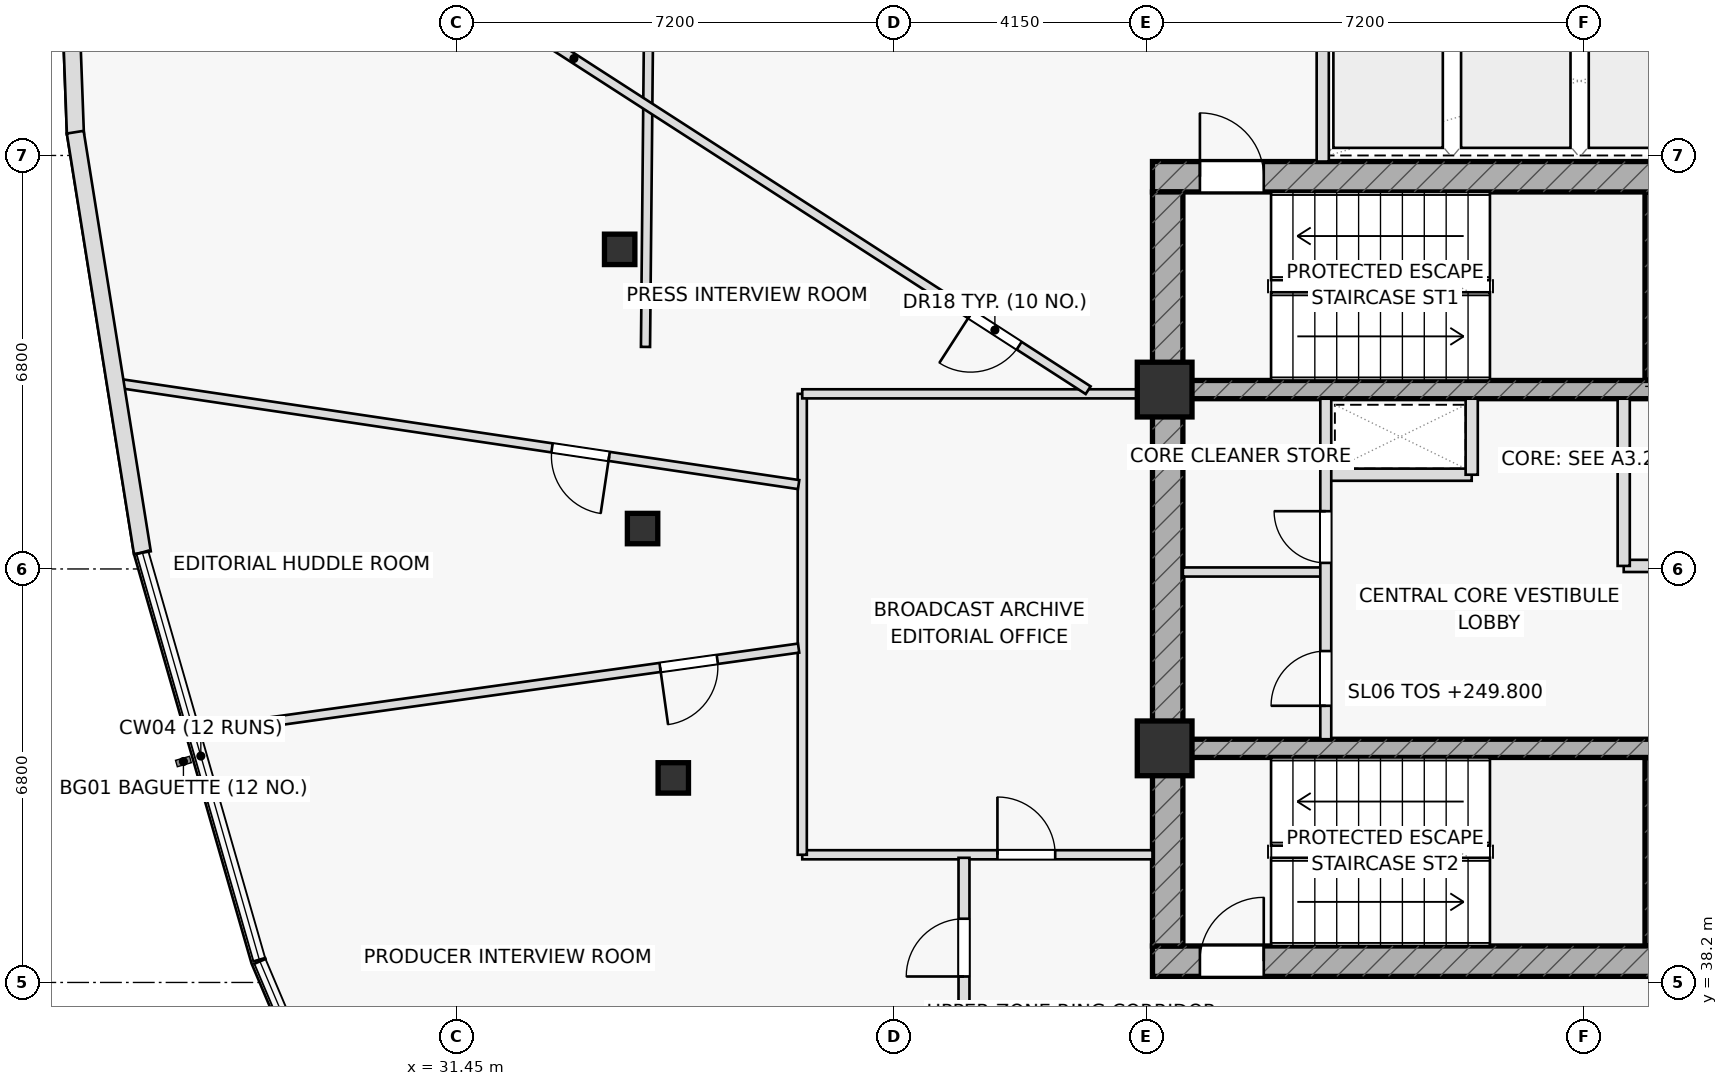
"""IFC4 building model, lengths in metres.
Left out: names, types, materials, properties, quantities, classifications, styles, units other than length and angle.
Written with IfcOpenShell. Run it as: python <this file> out.ifc"""

import sys

from ifc_helpers import new_model, si_unit, direction, frame, frame_2d, origin, origin_2d, place, context, subcontext, project, spatial, rectangle, hollow_rectangle, extrude, element, fill, save


model = new_model("IFC4")
c1 = context("Model", 3, precision=1e-05, world=origin(), true_north=direction((0.0, 1.0)))
c2 = subcontext(c1, "Body", "Model", "MODEL_VIEW")
j1 = project(units=[si_unit("LENGTHUNIT", "METRE"), si_unit("PLANEANGLEUNIT", "RADIAN")], contexts=[c1])
p1 = place(None, origin())
s1 = spatial("IfcSite", under=j1, at=p1, CompositionType="ELEMENT")
p2 = place(p1, origin())
s2 = spatial("IfcBuilding", under=s1, at=p2, CompositionType="ELEMENT")
p3 = place(p2, frame((0.0, 0.0, 249.8)))
s3 = spatial("IfcBuildingStorey", under=s2, at=p3, CompositionType="ELEMENT", Elevation=249.8)
for number, where, z_axis, x_axis in (
    (1, (51.11, 48.1, 0.0), (0.0, 0.0, 1.0), (0.0, 1.0, 0.0)),
    (2, (51.11, 38.8, 0.0), (0.0, 0.0, 1.0), (0.0, 1.0, 0.0)),
):
    element("IfcWall", number, at=place(p3, frame(where, z_axis=z_axis, x_axis=x_axis)), inside=s3, PredefinedType="SHEAR", context=c2, shape_type="SweptSolid", body=[
        extrude(rectangle(XDim=3.1, YDim=0.22, at=frame_2d((1.55, 0.0))), origin(), (0.0, 0.0, 1.0), 3.65),
    ])
p4 = place(p3, frame((42.9, 51.45, 0.0), z_axis=(0.0, 0.0, 1.0), x_axis=(1.0, 0.0, 0.0)))
e3 = element("IfcWall", 3, at=p4, inside=s3, PredefinedType="SHEAR", context=c2, shape_type="SweptSolid", body=[
    extrude(rectangle(XDim=14.2, YDim=0.5, at=frame_2d((7.1, 0.0))), origin(), (0.0, 0.0, 1.0), 3.65),
])
p5 = place(p4, frame((0.78, 0.0, 0.0)))
e4 = element("IfcOpeningElement", 4, at=p5, cuts=e3, PredefinedType="OPENING", context=c2, shape_type="SweptSolid", body=[
    extrude(rectangle(XDim=1.05, YDim=2.2, at=frame_2d((0.525, 1.1))), frame((0.0, 0.26, 0.0), z_axis=(0.0, -1.0, 0.0), x_axis=(1.0, 0.0, 0.0)), (0.0, 0.0, 1.0), 0.52),
])
p6 = place(p3, frame((42.9, 38.55, 0.0), z_axis=(0.0, 0.0, 1.0), x_axis=(1.0, 0.0, 0.0)))
e5 = element("IfcWall", 5, at=p6, inside=s3, PredefinedType="SHEAR", context=c2, shape_type="SweptSolid", body=[
    extrude(rectangle(XDim=14.2, YDim=0.5, at=frame_2d((7.1, 0.0))), origin(), (0.0, 0.0, 1.0), 3.65),
])
p7 = place(p6, frame((0.78, 0.0, 0.0)))
e6 = element("IfcOpeningElement", 6, at=p7, cuts=e5, PredefinedType="OPENING", context=c2, shape_type="SweptSolid", body=[
    extrude(rectangle(XDim=1.05, YDim=2.2, at=frame_2d((0.525, 1.1))), frame((0.0, 0.26, 0.0), z_axis=(0.0, -1.0, 0.0), x_axis=(1.0, 0.0, 0.0)), (0.0, 0.0, 1.0), 0.52),
])
p8 = place(p3, frame((43.15, 38.8, 0.0), z_axis=(0.0, 0.0, 1.0), x_axis=(0.0, 1.0, 0.0)))
e7 = element("IfcWall", 7, at=p8, inside=s3, PredefinedType="SHEAR", context=c2, shape_type="SweptSolid", body=[
    extrude(rectangle(XDim=12.4, YDim=0.5, at=frame_2d((6.2, 0.0))), origin(), (0.0, 0.0, 1.0), 3.65),
])
p9 = place(p3, frame((43.4, 47.95, 0.0), z_axis=(0.0, 0.0, 1.0), x_axis=(1.0, 0.0, 0.0)))
e8 = element("IfcWall", 8, at=p9, inside=s3, PredefinedType="SHEAR", context=c2, shape_type="SweptSolid", body=[
    extrude(rectangle(XDim=13.2, YDim=0.3, at=frame_2d((6.6, 0.0))), origin(), (0.0, 0.0, 1.0), 3.65),
])
p10 = place(p9, frame((8.345, 0.0, 0.0)))
e9 = element("IfcOpeningElement", 9, at=p10, cuts=e8, PredefinedType="OPENING", context=c2, shape_type="SweptSolid", body=[
    extrude(rectangle(XDim=1.15, YDim=2.2, at=frame_2d((0.575, 1.1))), frame((0.0, 0.16, 0.0), z_axis=(0.0, -1.0, 0.0), x_axis=(1.0, 0.0, 0.0)), (0.0, 0.0, 1.0), 0.32),
])
p11 = place(p9, frame((10.065, 0.0, 0.0)))
e10 = element("IfcOpeningElement", 10, at=p11, cuts=e8, PredefinedType="OPENING", context=c2, shape_type="SweptSolid", body=[
    extrude(rectangle(XDim=1.15, YDim=2.2, at=frame_2d((0.575, 1.1))), frame((0.0, 0.16, 0.0), z_axis=(0.0, -1.0, 0.0), x_axis=(1.0, 0.0, 0.0)), (0.0, 0.0, 1.0), 0.32),
])
p12 = place(p9, frame((11.645, 0.0, 0.0)))
e11 = element("IfcOpeningElement", 11, at=p12, cuts=e8, PredefinedType="OPENING", context=c2, shape_type="SweptSolid", body=[
    extrude(rectangle(XDim=1.15, YDim=2.2, at=frame_2d((0.575, 1.1))), frame((0.0, 0.16, 0.0), z_axis=(0.0, -1.0, 0.0), x_axis=(1.0, 0.0, 0.0)), (0.0, 0.0, 1.0), 0.32),
])
p13 = place(p3, frame((43.4, 42.05, 0.0), z_axis=(0.0, 0.0, 1.0), x_axis=(1.0, 0.0, 0.0)))
e12 = element("IfcWall", 12, at=p13, inside=s3, PredefinedType="SHEAR", context=c2, shape_type="SweptSolid", body=[
    extrude(rectangle(XDim=13.2, YDim=0.3, at=frame_2d((6.6, 0.0))), origin(), (0.0, 0.0, 1.0), 3.65),
])
p14 = place(p13, frame((9.1, 0.0, 0.0)))
e13 = element("IfcOpeningElement", 13, at=p14, cuts=e12, PredefinedType="OPENING", context=c2, shape_type="SweptSolid", body=[
    extrude(rectangle(XDim=1.5, YDim=2.2, at=frame_2d((0.75, 1.1))), frame((0.0, 0.16, 0.0), z_axis=(0.0, -1.0, 0.0), x_axis=(1.0, 0.0, 0.0)), (0.0, 0.0, 1.0), 0.32),
])
for number, where, z_axis, x_axis in (
    (14, (43.1, 47.95, 0.0), (0.0, 0.0, 1.0), (1.0, 0.0, 0.0)),
    (15, (43.1, 42.05, 0.0), (0.0, 0.0, 1.0), (1.0, 0.0, 0.0)),
):
    element("IfcColumn", number, at=place(p3, frame(where, z_axis=z_axis, x_axis=x_axis)), inside=s3, PredefinedType="COLUMN", context=c2, shape_type="SweptSolid", body=[
        extrude(rectangle(XDim=0.9, YDim=0.9, at=origin_2d()), origin(), (0.0, 0.0, 1.0), 3.65),
    ])
for number, where, z_axis, x_axis in (
    (16, (34.137, 50.256, 0.0), (0.0, 0.0, 1.0), (1.0, 0.0, 0.0)),
    (17, (34.514, 45.665, 0.0), (0.0, 0.0, 1.0), (1.0, 0.0, 0.0)),
    (18, (35.019, 41.564, 0.0), (0.0, 0.0, 1.0), (1.0, 0.0, 0.0)),
):
    element("IfcColumn", number, at=place(p3, frame(where, z_axis=z_axis, x_axis=x_axis)), inside=s3, PredefinedType="COLUMN", context=c2, shape_type="SweptSolid", body=[
        extrude(hollow_rectangle(XDim=0.5, YDim=0.5, WallThickness=0.03, at=origin_2d()), origin(), (0.0, 0.0, 1.0), 3.65),
    ])
p15 = place(p3, frame((45.7, 51.7, 0.0), z_axis=(0.0, 0.0, 1.0), x_axis=(0.0, 1.0, 0.0)))
e19 = element("IfcWall", 19, at=p15, inside=s3, PredefinedType="PARTITIONING", context=c2, shape_type="SweptSolid", body=[
    extrude(rectangle(XDim=2.6, YDim=0.2, at=frame_2d((1.3, 0.0))), origin(), (0.0, 0.0, 1.0), 3.65),
])
p16 = place(p3, frame((45.75, 46.55, 0.0), z_axis=(0.0, 0.0, 1.0), x_axis=(1.0, 0.0, 0.0)))
e20 = element("IfcWall", 20, at=p16, inside=s3, PredefinedType="PARTITIONING", context=c2, shape_type="SweptSolid", body=[
    extrude(rectangle(XDim=2.4, YDim=0.2, at=frame_2d((1.2, 0.0))), origin(), (0.0, 0.0, 1.0), 3.65),
])
p17 = place(p3, frame((48.15, 46.55, 0.0), z_axis=(0.0, 0.0, 1.0), x_axis=(0.0, 1.0, 0.0)))
e21 = element("IfcWall", 21, at=p17, inside=s3, PredefinedType="PARTITIONING", context=c2, shape_type="SweptSolid", body=[
    extrude(rectangle(XDim=1.25, YDim=0.2, at=frame_2d((0.625, 0.0))), origin(), (0.0, 0.0, 1.0), 3.65),
])
p18 = place(p3, frame((50.65, 45.05, 0.0), z_axis=(0.0, 0.0, 1.0), x_axis=(1.0, 0.0, 0.0)))
e22 = element("IfcWall", 22, at=p18, inside=s3, PredefinedType="PARTITIONING", context=c2, shape_type="SweptSolid", body=[
    extrude(rectangle(XDim=5.95, YDim=0.2, at=frame_2d((2.975, 0.0))), origin(), (0.0, 0.0, 1.0), 3.65),
])
p19 = place(p18, frame((1.35, 0.0, 0.0)))
e23 = element("IfcOpeningElement", 23, at=p19, cuts=e22, PredefinedType="OPENING", context=c2, shape_type="SweptSolid", body=[
    extrude(rectangle(XDim=1.5, YDim=2.2, at=frame_2d((0.75, 1.1))), frame((0.0, 0.11, 0.0), z_axis=(0.0, -1.0, 0.0), x_axis=(1.0, 0.0, 0.0)), (0.0, 0.0, 1.0), 0.22),
])
p20 = place(p3, frame((50.65, 45.05, 0.0), z_axis=(0.0, 0.0, 1.0), x_axis=(0.0, 1.0, 0.0)))
e24 = element("IfcWall", 24, at=p20, inside=s3, PredefinedType="PARTITIONING", context=c2, shape_type="SweptSolid", body=[
    extrude(rectangle(XDim=2.75, YDim=0.2, at=frame_2d((1.375, 0.0))), origin(), (0.0, 0.0, 1.0), 3.65),
])
p21 = place(p3, frame((43.4, 44.95, 0.0), z_axis=(0.0, 0.0, 1.0), x_axis=(1.0, 0.0, 0.0)))
e25 = element("IfcWall", 25, at=p21, inside=s3, PredefinedType="PARTITIONING", context=c2, shape_type="SweptSolid", body=[
    extrude(rectangle(XDim=2.35, YDim=0.15, at=frame_2d((1.175, 0.0))), origin(), (0.0, 0.0, 1.0), 3.65),
])
p22 = place(p3, frame((45.75, 42.2, 0.0), z_axis=(0.0, 0.0, 1.0), x_axis=(0.0, 1.0, 0.0)))
e26 = element("IfcWall", 26, at=p22, inside=s3, PredefinedType="PARTITIONING", context=c2, shape_type="SweptSolid", body=[
    extrude(rectangle(XDim=5.6, YDim=0.18, at=frame_2d((2.8, 0.0))), origin(), (0.0, 0.0, 1.0), 3.65),
])
p23 = place(p22, frame((0.55, 0.0, 0.0)))
e27 = element("IfcOpeningElement", 27, at=p23, cuts=e26, PredefinedType="OPENING", context=c2, shape_type="SweptSolid", body=[
    extrude(rectangle(XDim=0.9, YDim=2.05, at=frame_2d((0.45, 1.025))), frame((0.0, 0.1, 0.0), z_axis=(0.0, -1.0, 0.0), x_axis=(1.0, 0.0, 0.0)), (0.0, 0.0, 1.0), 0.2),
])
p24 = place(p22, frame((2.9, 0.0, 0.0)))
e28 = element("IfcOpeningElement", 28, at=p24, cuts=e26, PredefinedType="OPENING", context=c2, shape_type="SweptSolid", body=[
    extrude(rectangle(XDim=0.85, YDim=2.05, at=frame_2d((0.425, 1.025))), frame((0.0, 0.1, 0.0), z_axis=(0.0, -1.0, 0.0), x_axis=(1.0, 0.0, 0.0)), (0.0, 0.0, 1.0), 0.2),
])
p25 = place(p3, frame((34.652, 58.056, 0.0), z_axis=(0.0, 0.0, 1.0), x_axis=(-0.009553538759, -0.999954363907, 0.0)))
e29 = element("IfcWall", 29, at=p25, inside=s3, PredefinedType="PARTITIONING", context=c2, shape_type="SweptSolid", body=[
    extrude(rectangle(XDim=9.404, YDim=0.15, at=frame_2d((4.702, 0.0))), origin(), (0.0, 0.0, 1.0), 3.175),
])
p26 = place(p3, frame((37.14, 40.3, 0.0), z_axis=(0.0, 0.0, 1.0), x_axis=(1.0, 0.0, 0.0)))
e30 = element("IfcWall", 30, at=p26, inside=s3, PredefinedType="PARTITIONING", context=c2, shape_type="SweptSolid", body=[
    extrude(rectangle(XDim=5.76, YDim=0.15, at=frame_2d((2.88, 0.0))), origin(), (0.0, 0.0, 1.0), 3.075),
])
p27 = place(p26, frame((3.21, 0.0, 0.0)))
e31 = element("IfcOpeningElement", 31, at=p27, cuts=e30, PredefinedType="OPENING", context=c2, shape_type="SweptSolid", body=[
    extrude(rectangle(XDim=0.95, YDim=2.05, at=frame_2d((0.475, 1.025))), frame((0.0, 0.085, 0.0), z_axis=(0.0, -1.0, 0.0), x_axis=(1.0, 0.0, 0.0)), (0.0, 0.0, 1.0), 0.17),
])
p28 = place(p3, frame((37.14, 40.3, 0.0), z_axis=(0.0, 0.0, 1.0), x_axis=(0.0, 1.0, 0.0)))
e32 = element("IfcWall", 32, at=p28, inside=s3, PredefinedType="PARTITIONING", context=c2, shape_type="SweptSolid", body=[
    extrude(rectangle(XDim=7.58, YDim=0.15, at=frame_2d((3.79, 0.0))), origin(), (0.0, 0.0, 1.0), 3.65),
])
p29 = place(p3, frame((37.14, 47.88, 0.0), z_axis=(0.0, 0.0, 1.0), x_axis=(1.0, 0.0, 0.0)))
e33 = element("IfcWall", 33, at=p29, inside=s3, PredefinedType="PARTITIONING", context=c2, shape_type="SweptSolid", body=[
    extrude(rectangle(XDim=5.76, YDim=0.15, at=frame_2d((2.88, 0.0))), origin(), (0.0, 0.0, 1.0), 3.075),
])
p30 = place(p3, frame((41.842, 47.94, 0.0), z_axis=(0.0, 0.0, 1.0), x_axis=(-0.840361703529, 0.542026020817, 0.0)))
e34 = element("IfcWall", 34, at=p30, inside=s3, PredefinedType="PARTITIONING", context=c2, shape_type="SweptSolid", body=[
    extrude(rectangle(XDim=20.127, YDim=0.15, at=frame_2d((10.063, 0.0))), origin(), (0.0, 0.0, 1.0), 3.075),
])
p31 = place(p30, frame((1.35, 0.0, 0.0)))
e35 = element("IfcOpeningElement", 35, at=p31, cuts=e34, PredefinedType="OPENING", context=c2, shape_type="SweptSolid", body=[
    extrude(rectangle(XDim=0.95, YDim=2.05, at=frame_2d((0.475, 1.025))), frame((0.0, 0.085, 0.0), z_axis=(0.0, -1.0, 0.0), x_axis=(1.0, 0.0, 0.0)), (0.0, 0.0, 1.0), 0.17),
])
p32 = place(p3, frame((37.08, 46.387, 0.0), z_axis=(0.0, 0.0, 1.0), x_axis=(-0.989097164513, 0.14726438521, 0.0)))
e36 = element("IfcWall", 36, at=p32, inside=s3, PredefinedType="PARTITIONING", context=c2, shape_type="SweptSolid", body=[
    extrude(rectangle(XDim=11.373, YDim=0.15, at=frame_2d((5.687, 0.0))), origin(), (0.0, 0.0, 1.0), 3.075),
])
p33 = place(p32, frame((3.15, 0.0, 0.0)))
e37 = element("IfcOpeningElement", 37, at=p33, cuts=e36, PredefinedType="OPENING", context=c2, shape_type="SweptSolid", body=[
    extrude(rectangle(XDim=0.95, YDim=2.05, at=frame_2d((0.475, 1.025))), frame((0.0, 0.085, 0.0), z_axis=(0.0, -1.0, 0.0), x_axis=(1.0, 0.0, 0.0)), (0.0, 0.0, 1.0), 0.17),
])
p34 = place(p3, frame((37.08, 43.699, 0.0), z_axis=(0.0, 0.0, 1.0), x_axis=(-0.99039205397, -0.138288030693, 0.0)))
e38 = element("IfcWall", 38, at=p34, inside=s3, PredefinedType="PARTITIONING", context=c2, shape_type="SweptSolid", body=[
    extrude(rectangle(XDim=10.049, YDim=0.15, at=frame_2d((5.024, 0.0))), origin(), (0.0, 0.0, 1.0), 3.175),
])
p35 = place(p34, frame((1.35, 0.0, 0.0)))
e39 = element("IfcOpeningElement", 39, at=p35, cuts=e38, PredefinedType="OPENING", context=c2, shape_type="SweptSolid", body=[
    extrude(rectangle(XDim=0.95, YDim=2.05, at=frame_2d((0.475, 1.025))), frame((0.0, 0.085, 0.0), z_axis=(0.0, -1.0, 0.0), x_axis=(1.0, 0.0, 0.0)), (0.0, 0.0, 1.0), 0.17),
])
p36 = place(p3, frame((39.8, 36.17, 0.0), z_axis=(0.0, 0.0, 1.0), x_axis=(0.0, 1.0, 0.0)))
e40 = element("IfcWall", 40, at=p36, inside=s3, PredefinedType="PARTITIONING", context=c2, shape_type="SweptSolid", body=[
    extrude(rectangle(XDim=4.08, YDim=0.18, at=frame_2d((2.04, 0.0))), origin(), (0.0, 0.0, 1.0), 3.355),
])
p37 = place(p36, frame((2.128, 0.0, 0.0)))
e41 = element("IfcOpeningElement", 41, at=p37, cuts=e40, PredefinedType="OPENING", context=c2, shape_type="SweptSolid", body=[
    extrude(rectangle(XDim=0.95, YDim=2.05, at=frame_2d((0.475, 1.025))), frame((0.0, 0.1, 0.0), z_axis=(0.0, -1.0, 0.0), x_axis=(1.0, 0.0, 0.0)), (0.0, 0.0, 1.0), 0.2),
])
p38 = place(p3, frame((24.926, 59.162, 0.0), z_axis=(0.0, 0.0, 1.0), x_axis=(0.037034833495, -0.999313975239, 0.0)))
e42 = element("IfcWall", 42, at=p38, inside=s3, PredefinedType="STANDARD", context=c2, shape_type="SweptSolid", body=[
    extrude(rectangle(XDim=7.014, YDim=0.28, at=frame_2d((3.507, 0.0))), origin(), (0.0, 0.0, 1.0), 3.65),
])
p39 = place(p3, frame((25.183, 52.183, 0.0), z_axis=(0.0, 0.0, 1.0), x_axis=(0.157734846352, -0.987481502736, 0.0)))
e43 = element("IfcWall", 43, at=p39, inside=s3, PredefinedType="STANDARD", context=c2, shape_type="SweptSolid", body=[
    extrude(rectangle(XDim=7.002, YDim=0.28, at=frame_2d((3.501, 0.0))), origin(), (0.0, 0.0, 1.0), 3.65),
])
p40 = place(p5, origin())
e44 = element("IfcDoor", 44, at=p40, inside=s3, OperationType="SINGLE_SWING_LEFT", PredefinedType="DOOR", context=c2, shape_type="SweptSolid", body=[
    extrude(rectangle(XDim=1.05, YDim=2.2, at=frame_2d((0.525, 1.1))), frame((0.0, 0.025, 0.0), z_axis=(0.0, -1.0, 0.0), x_axis=(1.0, 0.0, 0.0)), (0.0, 0.0, 1.0), 0.05),
])
fill(e4, e44)
p41 = place(p7, origin())
e45 = element("IfcDoor", 45, at=p41, inside=s3, OperationType="SINGLE_SWING_RIGHT", PredefinedType="DOOR", context=c2, shape_type="SweptSolid", body=[
    extrude(rectangle(XDim=1.05, YDim=2.2, at=frame_2d((0.525, 1.1))), frame((0.0, 0.025, 0.0), z_axis=(0.0, -1.0, 0.0), x_axis=(1.0, 0.0, 0.0)), (0.0, 0.0, 1.0), 0.05),
])
fill(e6, e45)
p42 = place(p23, origin())
e46 = element("IfcDoor", 46, at=p42, inside=s3, OperationType="SINGLE_SWING_LEFT", PredefinedType="DOOR", context=c2, shape_type="SweptSolid", body=[
    extrude(rectangle(XDim=0.9, YDim=2.05, at=frame_2d((0.45, 1.025))), frame((0.0, 0.025, 0.0), z_axis=(0.0, -1.0, 0.0), x_axis=(1.0, 0.0, 0.0)), (0.0, 0.0, 1.0), 0.05),
])
fill(e27, e46)
p43 = place(p24, origin())
e47 = element("IfcDoor", 47, at=p43, inside=s3, OperationType="SINGLE_SWING_RIGHT", PredefinedType="DOOR", context=c2, shape_type="SweptSolid", body=[
    extrude(rectangle(XDim=0.85, YDim=2.05, at=frame_2d((0.425, 1.025))), frame((0.0, 0.025, 0.0), z_axis=(0.0, -1.0, 0.0), x_axis=(1.0, 0.0, 0.0)), (0.0, 0.0, 1.0), 0.05),
])
fill(e28, e47)
p44 = place(p27, origin())
e48 = element("IfcDoor", 48, at=p44, inside=s3, OperationType="SINGLE_SWING_LEFT", PredefinedType="DOOR", context=c2, shape_type="SweptSolid", body=[
    extrude(rectangle(XDim=0.95, YDim=2.05, at=frame_2d((0.475, 1.025))), frame((0.0, 0.025, 0.0), z_axis=(0.0, -1.0, 0.0), x_axis=(1.0, 0.0, 0.0)), (0.0, 0.0, 1.0), 0.05),
])
fill(e31, e48)
p45 = place(p31, origin())
e49 = element("IfcDoor", 49, at=p45, inside=s3, OperationType="SINGLE_SWING_RIGHT", PredefinedType="DOOR", context=c2, shape_type="SweptSolid", body=[
    extrude(rectangle(XDim=0.95, YDim=2.05, at=frame_2d((0.475, 1.025))), frame((0.0, 0.025, 0.0), z_axis=(0.0, -1.0, 0.0), x_axis=(1.0, 0.0, 0.0)), (0.0, 0.0, 1.0), 0.05),
])
fill(e35, e49)
p46 = place(p33, origin())
e50 = element("IfcDoor", 50, at=p46, inside=s3, OperationType="SINGLE_SWING_LEFT", PredefinedType="DOOR", context=c2, shape_type="SweptSolid", body=[
    extrude(rectangle(XDim=0.95, YDim=2.05, at=frame_2d((0.475, 1.025))), frame((0.0, 0.025, 0.0), z_axis=(0.0, -1.0, 0.0), x_axis=(1.0, 0.0, 0.0)), (0.0, 0.0, 1.0), 0.05),
])
fill(e37, e50)
p47 = place(p35, origin())
e51 = element("IfcDoor", 51, at=p47, inside=s3, OperationType="SINGLE_SWING_RIGHT", PredefinedType="DOOR", context=c2, shape_type="SweptSolid", body=[
    extrude(rectangle(XDim=0.95, YDim=2.05, at=frame_2d((0.475, 1.025))), frame((0.0, 0.025, 0.0), z_axis=(0.0, -1.0, 0.0), x_axis=(1.0, 0.0, 0.0)), (0.0, 0.0, 1.0), 0.05),
])
fill(e39, e51)
p48 = place(p37, origin())
e52 = element("IfcDoor", 52, at=p48, inside=s3, OperationType="SINGLE_SWING_LEFT", PredefinedType="DOOR", context=c2, shape_type="SweptSolid", body=[
    extrude(rectangle(XDim=0.95, YDim=2.05, at=frame_2d((0.475, 1.025))), frame((0.0, 0.025, 0.0), z_axis=(0.0, -1.0, 0.0), x_axis=(1.0, 0.0, 0.0)), (0.0, 0.0, 1.0), 0.05),
])
fill(e41, e52)
save(model, sys.argv[1])
